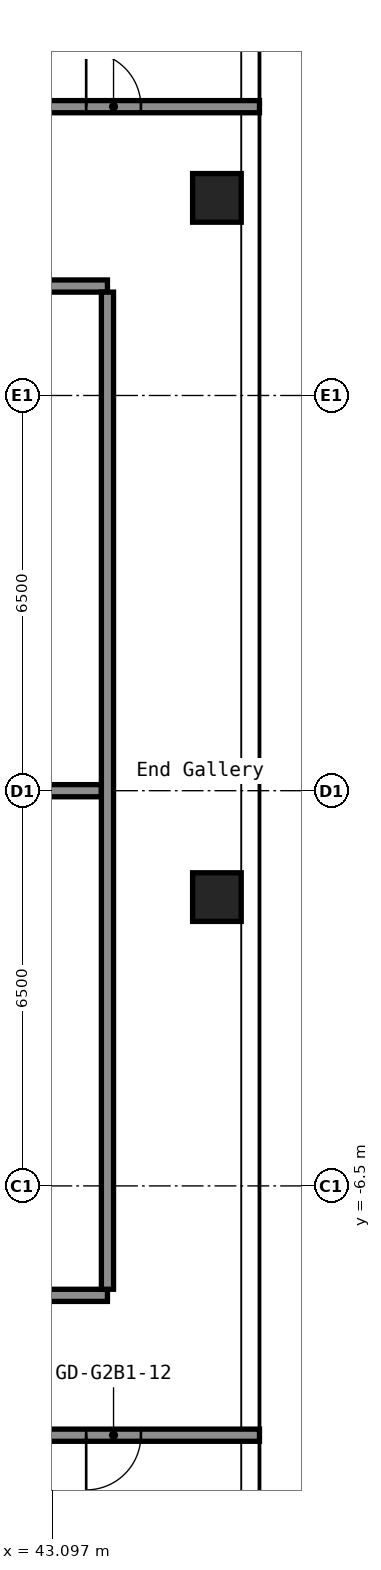
"""IFC4 building model, lengths in metres.
Left out: names, types, materials, properties, quantities, classifications, styles, units other than length and angle.
Written with IfcOpenShell. Run it as: python <this file> out.ifc"""

import sys

from ifc_helpers import new_model, si_unit, direction, frame, frame_2d, origin, origin_2d, place, context, subcontext, project, spatial, rectangle, hollow_rectangle, extrude, element, fill, save


model = new_model("IFC4")
c1 = context("Model", 3, precision=1e-05, world=origin(), true_north=direction((0.0, 1.0)))
c2 = subcontext(c1, "Body", "Model", "MODEL_VIEW")
j1 = project(units=[si_unit("LENGTHUNIT", "METRE"), si_unit("PLANEANGLEUNIT", "RADIAN")], contexts=[c1])
p1 = place(None, origin())
s1 = spatial("IfcSite", under=j1, at=p1, CompositionType="ELEMENT")
p2 = place(p1, origin())
s2 = spatial("IfcBuilding", under=s1, at=p2, CompositionType="ELEMENT")
p3 = place(p2, frame((0.0, 0.0, 94.6)))
s3 = spatial("IfcBuildingStorey", under=s2, at=p3, CompositionType="ELEMENT", Elevation=94.6)
for number, where, z_axis, x_axis in (
    (1, (45.8, -1.75, 0.0), (0.0, 0.0, 1.0), (1.0, 0.0, 0.0)),
    (2, (45.8, 9.75, 0.0), (0.0, 0.0, 1.0), (1.0, 0.0, 0.0)),
):
    element("IfcColumn", number, at=place(p3, frame(where, z_axis=z_axis, x_axis=x_axis)), inside=s3, PredefinedType="COLUMN", context=c2, shape_type="SweptSolid", body=[
        extrude(hollow_rectangle(XDim=0.8, YDim=0.8, WallThickness=0.032, at=origin_2d()), origin(), (0.0, 0.0, 1.0), 2.8),
    ])
p4 = place(p3, frame((16.8, -10.6, 0.0), z_axis=(0.0, 0.0, 1.0), x_axis=(1.0, 0.0, 0.0)))
e3 = element("IfcWall", 3, at=p4, inside=s3, PredefinedType="PARTITIONING", context=c2, shape_type="SweptSolid", body=[
    extrude(rectangle(XDim=29.7, YDim=0.2, at=frame_2d((14.85, 0.0))), origin(), (0.0, 0.0, 1.0), 2.8),
])
p5 = place(p4, frame((1.4, 0.0, 0.0)))
e4 = element("IfcOpeningElement", 4, at=p5, cuts=e3, PredefinedType="OPENING", context=c2, shape_type="SweptSolid", body=[
    extrude(rectangle(XDim=0.9, YDim=2.1, at=frame_2d((0.45, 1.05))), frame((0.0, 0.11, 0.0), z_axis=(0.0, -1.0, 0.0), x_axis=(1.0, 0.0, 0.0)), (0.0, 0.0, 1.0), 0.22),
])
p6 = place(p4, frame((5.6, 0.0, 0.0)))
e5 = element("IfcOpeningElement", 5, at=p6, cuts=e3, PredefinedType="OPENING", context=c2, shape_type="SweptSolid", body=[
    extrude(rectangle(XDim=0.9, YDim=2.1, at=frame_2d((0.45, 1.05))), frame((0.0, 0.11, 0.0), z_axis=(0.0, -1.0, 0.0), x_axis=(1.0, 0.0, 0.0)), (0.0, 0.0, 1.0), 0.22),
])
p7 = place(p4, frame((12.1, 0.0, 0.0)))
e6 = element("IfcOpeningElement", 6, at=p7, cuts=e3, PredefinedType="OPENING", context=c2, shape_type="SweptSolid", body=[
    extrude(rectangle(XDim=1.0, YDim=2.1, at=frame_2d((0.5, 1.05))), frame((0.0, 0.11, 0.0), z_axis=(0.0, -1.0, 0.0), x_axis=(1.0, 0.0, 0.0)), (0.0, 0.0, 1.0), 0.22),
])
p8 = place(p4, frame((18.955, 0.0, 0.0)))
e7 = element("IfcOpeningElement", 7, at=p8, cuts=e3, PredefinedType="OPENING", context=c2, shape_type="SweptSolid", body=[
    extrude(rectangle(XDim=0.9, YDim=2.1, at=frame_2d((0.45, 1.05))), frame((0.0, 0.11, 0.0), z_axis=(0.0, -1.0, 0.0), x_axis=(1.0, 0.0, 0.0)), (0.0, 0.0, 1.0), 0.22),
])
p9 = place(p4, frame((23.155, 0.0, 0.0)))
e8 = element("IfcOpeningElement", 8, at=p9, cuts=e3, PredefinedType="OPENING", context=c2, shape_type="SweptSolid", body=[
    extrude(rectangle(XDim=0.9, YDim=2.1, at=frame_2d((0.45, 1.05))), frame((0.0, 0.11, 0.0), z_axis=(0.0, -1.0, 0.0), x_axis=(1.0, 0.0, 0.0)), (0.0, 0.0, 1.0), 0.22),
])
p10 = place(p4, frame((26.85, 0.0, 0.0)))
e9 = element("IfcOpeningElement", 9, at=p10, cuts=e3, PredefinedType="OPENING", context=c2, shape_type="SweptSolid", body=[
    extrude(rectangle(XDim=0.9, YDim=2.1, at=frame_2d((0.45, 1.05))), frame((0.0, 0.11, 0.0), z_axis=(0.0, -1.0, 0.0), x_axis=(1.0, 0.0, 0.0)), (0.0, 0.0, 1.0), 0.22),
])
p11 = place(p3, frame((33.6, -8.3, 0.0), z_axis=(0.0, 0.0, 1.0), x_axis=(1.0, 0.0, 0.0)))
e10 = element("IfcWall", 10, at=p11, inside=s3, PredefinedType="PARTITIONING", context=c2, shape_type="SweptSolid", body=[
    extrude(rectangle(XDim=10.4, YDim=0.2, at=frame_2d((5.2, 0.0))), origin(), (0.0, 0.0, 1.0), 2.8),
])
p12 = place(p11, frame((6.35, 0.0, 0.0)))
e11 = element("IfcOpeningElement", 11, at=p12, cuts=e10, PredefinedType="OPENING", context=c2, shape_type="SweptSolid", body=[
    extrude(rectangle(XDim=1.0, YDim=2.1, at=frame_2d((0.5, 1.05))), frame((0.0, 0.11, 0.0), z_axis=(0.0, -1.0, 0.0), x_axis=(1.0, 0.0, 0.0)), (0.0, 0.0, 1.0), 0.22),
])
p13 = place(p3, frame((33.6, 0.0, 0.0), z_axis=(0.0, 0.0, 1.0), x_axis=(1.0, 0.0, 0.0)))
e12 = element("IfcWall", 12, at=p13, inside=s3, PredefinedType="PARTITIONING", context=c2, shape_type="SweptSolid", body=[
    extrude(rectangle(XDim=10.3, YDim=0.2, at=frame_2d((5.15, 0.0))), origin(), (0.0, 0.0, 1.0), 2.8),
])
p14 = place(p3, frame((33.6, 8.3, 0.0), z_axis=(0.0, 0.0, 1.0), x_axis=(1.0, 0.0, 0.0)))
e13 = element("IfcWall", 13, at=p14, inside=s3, PredefinedType="PARTITIONING", context=c2, shape_type="SweptSolid", body=[
    extrude(rectangle(XDim=10.4, YDim=0.2, at=frame_2d((5.2, 0.0))), origin(), (0.0, 0.0, 1.0), 2.8),
])
p15 = place(p14, frame((6.35, 0.0, 0.0)))
e14 = element("IfcOpeningElement", 14, at=p15, cuts=e13, PredefinedType="OPENING", context=c2, shape_type="SweptSolid", body=[
    extrude(rectangle(XDim=1.0, YDim=2.1, at=frame_2d((0.5, 1.05))), frame((0.0, 0.11, 0.0), z_axis=(0.0, -1.0, 0.0), x_axis=(1.0, 0.0, 0.0)), (0.0, 0.0, 1.0), 0.22),
])
p16 = place(p3, frame((16.8, 11.25, 0.0), z_axis=(0.0, 0.0, 1.0), x_axis=(1.0, 0.0, 0.0)))
e15 = element("IfcWall", 15, at=p16, inside=s3, PredefinedType="PARTITIONING", context=c2, shape_type="SweptSolid", body=[
    extrude(rectangle(XDim=29.7, YDim=0.2, at=frame_2d((14.85, 0.0))), origin(), (0.0, 0.0, 1.0), 2.8),
])
p17 = place(p16, frame((3.4, 0.0, 0.0)))
e16 = element("IfcOpeningElement", 16, at=p17, cuts=e15, PredefinedType="OPENING", context=c2, shape_type="SweptSolid", body=[
    extrude(rectangle(XDim=1.6, YDim=2.1, at=frame_2d((0.8, 1.05))), frame((0.0, 0.11, 0.0), z_axis=(0.0, -1.0, 0.0), x_axis=(1.0, 0.0, 0.0)), (0.0, 0.0, 1.0), 0.22),
])
p18 = place(p16, frame((11.8, 0.0, 0.0)))
e17 = element("IfcOpeningElement", 17, at=p18, cuts=e15, PredefinedType="OPENING", context=c2, shape_type="SweptSolid", body=[
    extrude(rectangle(XDim=1.6, YDim=2.1, at=frame_2d((0.8, 1.05))), frame((0.0, 0.11, 0.0), z_axis=(0.0, -1.0, 0.0), x_axis=(1.0, 0.0, 0.0)), (0.0, 0.0, 1.0), 0.22),
])
p19 = place(p16, frame((20.2, 0.0, 0.0)))
e18 = element("IfcOpeningElement", 18, at=p19, cuts=e15, PredefinedType="OPENING", context=c2, shape_type="SweptSolid", body=[
    extrude(rectangle(XDim=1.6, YDim=2.1, at=frame_2d((0.8, 1.05))), frame((0.0, 0.11, 0.0), z_axis=(0.0, -1.0, 0.0), x_axis=(1.0, 0.0, 0.0)), (0.0, 0.0, 1.0), 0.22),
])
p20 = place(p16, frame((26.85, 0.0, 0.0)))
e19 = element("IfcOpeningElement", 19, at=p20, cuts=e15, PredefinedType="OPENING", context=c2, shape_type="SweptSolid", body=[
    extrude(rectangle(XDim=0.9, YDim=2.1, at=frame_2d((0.45, 1.05))), frame((0.0, 0.11, 0.0), z_axis=(0.0, -1.0, 0.0), x_axis=(1.0, 0.0, 0.0)), (0.0, 0.0, 1.0), 0.22),
])
p21 = place(p3, frame((44.0, -8.2, 0.0), z_axis=(0.0, 0.0, 1.0), x_axis=(0.0, 1.0, 0.0)))
e20 = element("IfcWall", 20, at=p21, inside=s3, PredefinedType="PARTITIONING", context=c2, shape_type="SweptSolid", body=[
    extrude(rectangle(XDim=16.4, YDim=0.2, at=frame_2d((8.2, 0.0))), origin(), (0.0, 0.0, 1.0), 2.8),
])
p22 = place(p10, origin())
e21 = element("IfcDoor", 21, at=p22, inside=s3, OperationType="SINGLE_SWING_LEFT", PredefinedType="DOOR", context=c2, shape_type="SweptSolid", body=[
    extrude(rectangle(XDim=0.9, YDim=2.1, at=frame_2d((0.45, 1.05))), frame((0.0, 0.025, 0.0), z_axis=(0.0, -1.0, 0.0), x_axis=(1.0, 0.0, 0.0)), (0.0, 0.0, 1.0), 0.05),
])
fill(e9, e21)
p23 = place(p20, origin())
e22 = element("IfcDoor", 22, at=p23, inside=s3, OperationType="SINGLE_SWING_RIGHT", PredefinedType="DOOR", context=c2, shape_type="SweptSolid", body=[
    extrude(rectangle(XDim=0.9, YDim=2.1, at=frame_2d((0.45, 1.05))), frame((0.0, 0.025, 0.0), z_axis=(0.0, -1.0, 0.0), x_axis=(1.0, 0.0, 0.0)), (0.0, 0.0, 1.0), 0.05),
])
fill(e19, e22)
save(model, sys.argv[1])
